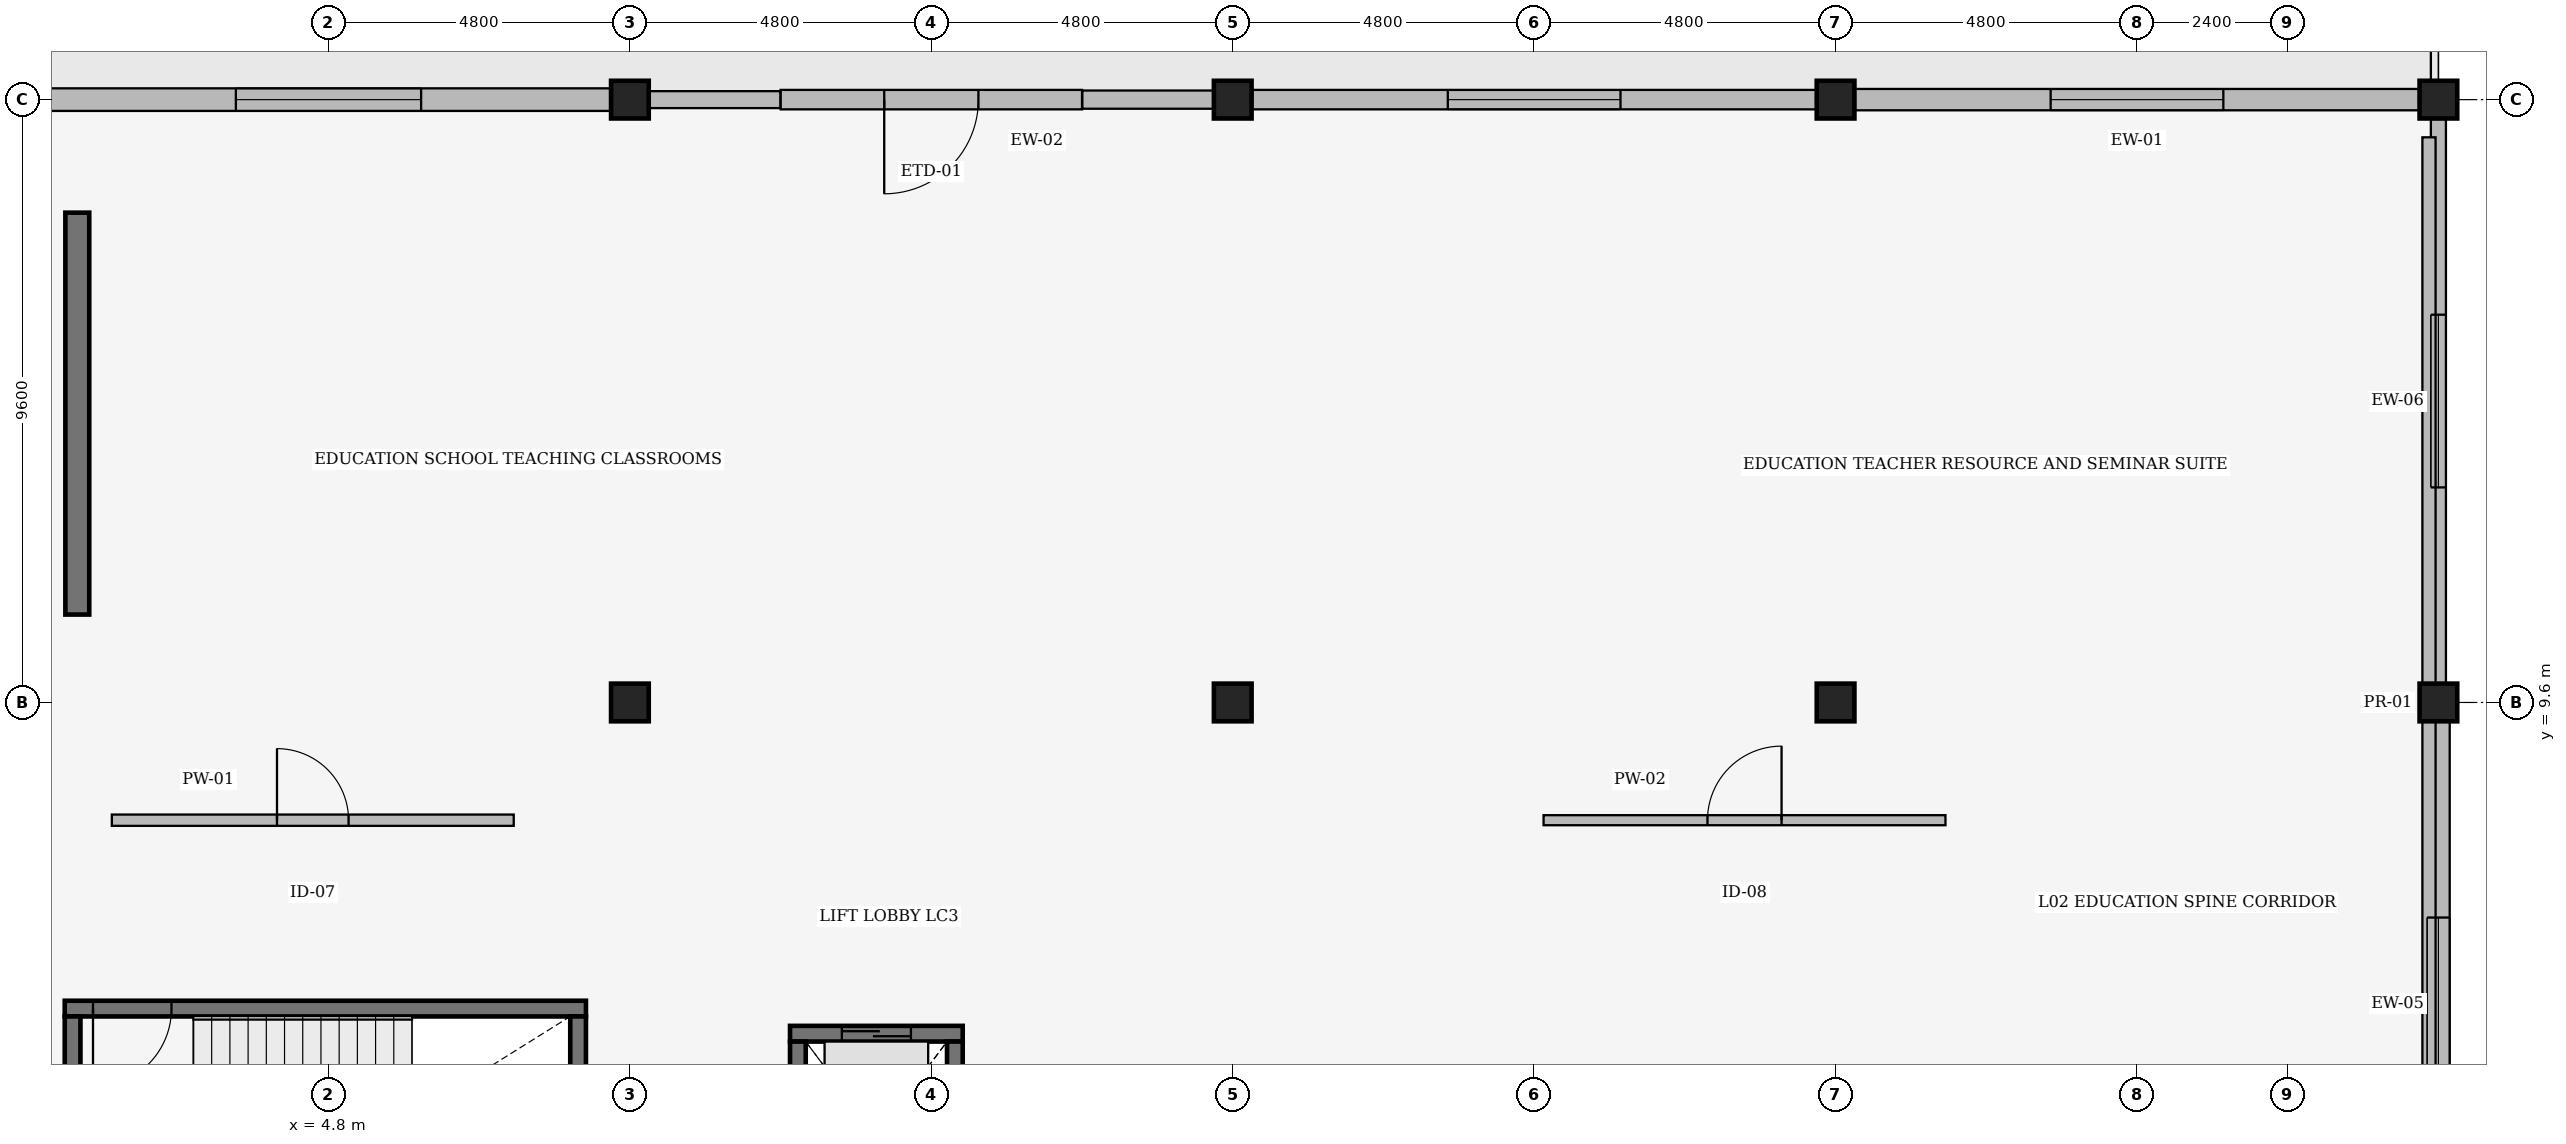
"""IFC4 building model, lengths in metres.
Left out: names, types, materials, properties, quantities, classifications, styles, units other than length and angle.
Written with IfcOpenShell. Run it as: python <this file> out.ifc"""

import sys

from ifc_helpers import new_model, si_unit, direction, frame, frame_2d, origin, origin_2d, place, context, subcontext, project, spatial, rectangle, extrude, element, fill, save


model = new_model("IFC4")
c1 = context("Model", 3, precision=1e-05, world=origin(), true_north=direction((0.0, 1.0)))
c2 = subcontext(c1, "Body", "Model", "MODEL_VIEW")
j1 = project(units=[si_unit("LENGTHUNIT", "METRE"), si_unit("PLANEANGLEUNIT", "RADIAN")], contexts=[c1])
p1 = place(None, origin())
s1 = spatial("IfcSite", under=j1, at=p1, CompositionType="ELEMENT")
p2 = place(p1, origin())
s2 = spatial("IfcBuilding", under=s1, at=p2, CompositionType="ELEMENT")
p3 = place(p2, frame((0.0, 0.0, 10.5)))
s3 = spatial("IfcBuildingStorey", under=s2, at=p3, CompositionType="ELEMENT", Elevation=10.5)
for number, where, z_axis, x_axis in (
    (1, (9.6, 9.6, 0.0), (0.0, 0.0, 1.0), (1.0, 0.0, 0.0)),
    (2, (9.6, 19.2, 0.0), (0.0, 0.0, 1.0), (1.0, 0.0, 0.0)),
    (3, (19.2, 9.6, 0.0), (0.0, 0.0, 1.0), (1.0, 0.0, 0.0)),
    (4, (19.2, 19.2, 0.0), (0.0, 0.0, 1.0), (1.0, 0.0, 0.0)),
    (5, (28.8, 9.6, 0.0), (0.0, 0.0, 1.0), (1.0, 0.0, 0.0)),
    (6, (28.8, 19.2, 0.0), (0.0, 0.0, 1.0), (1.0, 0.0, 0.0)),
    (7, (38.4, 9.6, 0.0), (0.0, 0.0, 1.0), (1.0, 0.0, 0.0)),
    (8, (38.4, 19.2, 0.0), (0.0, 0.0, 1.0), (1.0, 0.0, 0.0)),
):
    element("IfcColumn", number, at=place(p3, frame(where, z_axis=z_axis, x_axis=x_axis)), inside=s3, PredefinedType="COLUMN", context=c2, shape_type="SweptSolid", body=[
        extrude(rectangle(XDim=0.6, YDim=0.6, at=origin_2d()), origin(), (0.0, 0.0, 1.0), 4.8),
    ])
p4 = place(p3, frame((0.8, 11.0, 0.0), z_axis=(0.0, 0.0, 1.0), x_axis=(0.0, 1.0, 0.0)))
e9 = element("IfcWall", 9, at=p4, inside=s3, PredefinedType="SHEAR", context=c2, shape_type="SweptSolid", body=[
    extrude(rectangle(XDim=6.4, YDim=0.38, at=frame_2d((3.2, 0.0))), origin(), (0.0, 0.0, 1.0), 4.8),
])
p5 = place(p3, frame((16.8, 19.2, 0.0), z_axis=(0.0, 0.0, 1.0), x_axis=(-1.0, 0.0, 0.0)))
e10 = element("IfcWall", 10, at=p5, inside=s3, PredefinedType="SOLIDWALL", context=c2, shape_type="SweptSolid", body=[
    extrude(rectangle(XDim=4.8, YDim=0.31, at=frame_2d((2.4, 0.0))), origin(), (0.0, 0.0, 1.0), 4.283),
])
p6 = place(p5, frame((3.15, 0.0, 0.0), z_axis=(0.0, 0.0, 1.0), x_axis=(-1.0, 0.0, 0.0)))
e11 = element("IfcOpeningElement", 11, at=p6, cuts=e10, PredefinedType="OPENING", context=c2, shape_type="SweptSolid", body=[
    extrude(rectangle(XDim=1.5, YDim=2.25, at=frame_2d((0.75, 1.125))), frame((0.0, 0.165, 0.0), z_axis=(0.0, -1.0, 0.0), x_axis=(1.0, 0.0, 0.0)), (0.0, 0.0, 1.0), 0.33),
])
p7 = place(p3, frame((38.4, 0.308, 0.0), z_axis=(0.0, 0.0, 1.0), x_axis=(0.0, 1.0, 0.0)))
e12 = element("IfcWall", 12, at=p7, inside=s3, PredefinedType="SOLIDWALL", context=c2, shape_type="SweptSolid", body=[
    extrude(rectangle(XDim=8.984, YDim=0.36, at=frame_2d((4.492, 0.0))), origin(), (0.0, 0.0, 1.0), 4.123),
])
p8 = place(p7, frame((3.117, 0.0, 0.95)))
e13 = element("IfcOpeningElement", 13, at=p8, cuts=e12, PredefinedType="OPENING", context=c2, shape_type="SweptSolid", body=[
    extrude(rectangle(XDim=2.75, YDim=1.2, at=frame_2d((1.375, 0.6))), frame((0.0, 0.19, 0.0), z_axis=(0.0, -1.0, 0.0), x_axis=(1.0, 0.0, 0.0)), (0.0, 0.0, 1.0), 0.38),
])
p9 = place(p3, frame((38.4, 9.908, 0.0), z_axis=(0.0, 0.0, 1.0), x_axis=(0.0, 1.0, 0.0)))
e14 = element("IfcWall", 14, at=p9, inside=s3, PredefinedType="SOLIDWALL", context=c2, shape_type="SweptSolid", body=[
    extrude(rectangle(XDim=8.984, YDim=0.24, at=frame_2d((4.492, 0.0))), origin(), (0.0, 0.0, 1.0), 4.123),
])
p10 = place(p9, frame((3.117, 0.0, 0.95)))
e15 = element("IfcOpeningElement", 15, at=p10, cuts=e14, PredefinedType="OPENING", context=c2, shape_type="SweptSolid", body=[
    extrude(rectangle(XDim=2.75, YDim=1.5, at=frame_2d((1.375, 0.75))), frame((0.0, 0.13, 0.0), z_axis=(0.0, -1.0, 0.0), x_axis=(1.0, 0.0, 0.0)), (0.0, 0.0, 1.0), 0.26),
])
p11 = place(p3, frame((38.092, 19.2, 0.0), z_axis=(0.0, 0.0, 1.0), x_axis=(-1.0, 0.0, 0.0)))
e16 = element("IfcWall", 16, at=p11, inside=s3, PredefinedType="SOLIDWALL", context=c2, shape_type="SweptSolid", body=[
    extrude(rectangle(XDim=8.984, YDim=0.34, at=frame_2d((4.492, 0.0))), origin(), (0.0, 0.0, 1.0), 4.178),
])
p12 = place(p11, frame((3.117, 0.0, 0.95)))
e17 = element("IfcOpeningElement", 17, at=p12, cuts=e16, PredefinedType="OPENING", context=c2, shape_type="SweptSolid", body=[
    extrude(rectangle(XDim=2.75, YDim=1.8, at=frame_2d((1.375, 0.9))), frame((0.0, 0.18, 0.0), z_axis=(0.0, -1.0, 0.0), x_axis=(1.0, 0.0, 0.0)), (0.0, 0.0, 1.0), 0.36),
])
p13 = place(p3, frame((28.492, 19.2, 0.0), z_axis=(0.0, 0.0, 1.0), x_axis=(-1.0, 0.0, 0.0)))
e18 = element("IfcWall", 18, at=p13, inside=s3, PredefinedType="SOLIDWALL", context=c2, shape_type="SweptSolid", body=[
    extrude(rectangle(XDim=8.984, YDim=0.31, at=frame_2d((4.492, 0.0))), origin(), (0.0, 0.0, 1.0), 3.875),
])
p14 = place(p13, frame((3.117, 0.0, 0.95)))
e19 = element("IfcOpeningElement", 19, at=p14, cuts=e18, PredefinedType="OPENING", context=c2, shape_type="SweptSolid", body=[
    extrude(rectangle(XDim=2.75, YDim=2.1, at=frame_2d((1.375, 1.05))), frame((0.0, 0.165, 0.0), z_axis=(0.0, -1.0, 0.0), x_axis=(1.0, 0.0, 0.0)), (0.0, 0.0, 1.0), 0.33),
])
p15 = place(p3, frame((18.892, 19.2, 0.0), z_axis=(0.0, 0.0, 1.0), x_axis=(-1.0, 0.0, 0.0)))
e20 = element("IfcWall", 20, at=p15, inside=s3, PredefinedType="SOLIDWALL", context=c2, shape_type="SweptSolid", body=[
    extrude(rectangle(XDim=2.087, YDim=0.29, at=frame_2d((1.043, 0.0))), origin(), (0.0, 0.0, 1.0), 3.875),
])
p16 = place(p3, frame((11.995, 19.2, 0.0), z_axis=(0.0, 0.0, 1.0), x_axis=(-1.0, 0.0, 0.0)))
e21 = element("IfcWall", 21, at=p16, inside=s3, PredefinedType="SOLIDWALL", context=c2, shape_type="SweptSolid", body=[
    extrude(rectangle(XDim=2.087, YDim=0.27, at=frame_2d((1.043, 0.0))), origin(), (0.0, 0.0, 1.0), 4.283),
])
p17 = place(p3, frame((9.292, 19.2, 0.0), z_axis=(0.0, 0.0, 1.0), x_axis=(-1.0, 0.0, 0.0)))
e22 = element("IfcWall", 22, at=p17, inside=s3, PredefinedType="SOLIDWALL", context=c2, shape_type="SweptSolid", body=[
    extrude(rectangle(XDim=8.984, YDim=0.36, at=frame_2d((4.492, 0.0))), origin(), (0.0, 0.0, 1.0), 4.178),
])
p18 = place(p17, frame((3.017, 0.0, 0.95)))
e23 = element("IfcOpeningElement", 23, at=p18, cuts=e22, PredefinedType="OPENING", context=c2, shape_type="SweptSolid", body=[
    extrude(rectangle(XDim=2.95, YDim=1.2, at=frame_2d((1.475, 0.6))), frame((0.0, 0.19, 0.0), z_axis=(0.0, -1.0, 0.0), x_axis=(1.0, 0.0, 0.0)), (0.0, 0.0, 1.0), 0.38),
])
p19 = place(p3, frame((38.25, 0.6, 4.8), z_axis=(0.0, 0.0, 1.0), x_axis=(0.0, 1.0, 0.0)))
e24 = element("IfcWall", 24, at=p19, inside=s3, PredefinedType="PARAPET", context=c2, shape_type="SweptSolid", body=[
    extrude(rectangle(XDim=18.0, YDim=0.21, at=frame_2d((9.0, 0.0))), origin(), (0.0, 0.0, 1.0), 0.55),
])
p20 = place(p3, frame((8.9, 4.725, 0.0), z_axis=(0.0, 0.0, 1.0), x_axis=(-1.0, 0.0, 0.0)))
e25 = element("IfcWall", 25, at=p20, inside=s3, PredefinedType="SHEAR", context=c2, shape_type="SweptSolid", body=[
    extrude(rectangle(XDim=8.3, YDim=0.25, at=frame_2d((4.15, 0.0))), origin(), (0.0, 0.0, 1.0), 4.52),
])
p21 = place(p20, frame((7.85, 0.0, 0.0), z_axis=(0.0, 0.0, 1.0), x_axis=(-1.0, 0.0, 0.0)))
e26 = element("IfcOpeningElement", 26, at=p21, cuts=e25, PredefinedType="OPENING", context=c2, shape_type="SweptSolid", body=[
    extrude(rectangle(XDim=1.25, YDim=2.2, at=frame_2d((0.625, 1.1))), frame((0.0, 0.135, 0.0), z_axis=(0.0, -1.0, 0.0), x_axis=(1.0, 0.0, 0.0)), (0.0, 0.0, 1.0), 0.27),
])
for number, where, z_axis, x_axis in (
    (27, (0.725, 4.6, 0.0), (0.0, 0.0, 1.0), (0.0, -1.0, 0.0)),
    (28, (8.775, 0.85, 0.0), (0.0, 0.0, 1.0), (0.0, 1.0, 0.0)),
):
    element("IfcWall", number, at=place(p3, frame(where, z_axis=z_axis, x_axis=x_axis)), inside=s3, PredefinedType="SHEAR", context=c2, shape_type="SweptSolid", body=[
        extrude(rectangle(XDim=3.75, YDim=0.25, at=frame_2d((1.875, 0.0))), origin(), (0.0, 0.0, 1.0), 4.52),
    ])
p22 = place(p3, frame((12.15, 4.325, 0.0), z_axis=(0.0, 0.0, 1.0), x_axis=(1.0, 0.0, 0.0)))
e29 = element("IfcWall", 29, at=p22, inside=s3, PredefinedType="SHEAR", context=c2, shape_type="SweptSolid", body=[
    extrude(rectangle(XDim=2.75, YDim=0.25, at=frame_2d((1.375, 0.0))), origin(), (0.0, 0.0, 1.0), 4.52),
])
p23 = place(p22, frame((0.825, 0.0, 0.0)))
e30 = element("IfcOpeningElement", 30, at=p23, cuts=e29, PredefinedType="OPENING", context=c2, shape_type="SweptSolid", body=[
    extrude(rectangle(XDim=1.1, YDim=2.2, at=frame_2d((0.55, 1.1))), frame((0.0, 0.135, 0.0), z_axis=(0.0, -1.0, 0.0), x_axis=(1.0, 0.0, 0.0)), (0.0, 0.0, 1.0), 0.27),
])
for number, where, z_axis, x_axis in (
    (31, (12.275, 1.2, 0.0), (0.0, 0.0, 1.0), (0.0, 1.0, 0.0)),
    (32, (14.775, 1.2, 0.0), (0.0, 0.0, 1.0), (0.0, 1.0, 0.0)),
):
    element("IfcWall", number, at=place(p3, frame(where, z_axis=z_axis, x_axis=x_axis)), inside=s3, PredefinedType="SHEAR", context=c2, shape_type="SweptSolid", body=[
        extrude(rectangle(XDim=3.0, YDim=0.25, at=frame_2d((1.5, 0.0))), origin(), (0.0, 0.0, 1.0), 4.52),
    ])
p24 = place(p3, frame((1.35, 7.725, 0.0), z_axis=(0.0, 0.0, 1.0), x_axis=(1.0, 0.0, 0.0)))
e33 = element("IfcWall", 33, at=p24, inside=s3, PredefinedType="PARTITIONING", context=c2, shape_type="SweptSolid", body=[
    extrude(rectangle(XDim=6.4, YDim=0.18, at=frame_2d((3.2, 0.0))), origin(), (0.0, 0.0, 1.0), 4.44),
])
p25 = place(p24, frame((2.63, 0.0, 0.0)))
e34 = element("IfcOpeningElement", 34, at=p25, cuts=e33, PredefinedType="OPENING", context=c2, shape_type="SweptSolid", body=[
    extrude(rectangle(XDim=1.14, YDim=2.22, at=frame_2d((0.57, 1.11))), frame((0.0, 0.1, 0.0), z_axis=(0.0, -1.0, 0.0), x_axis=(1.0, 0.0, 0.0)), (0.0, 0.0, 1.0), 0.2),
])
p26 = place(p3, frame((24.15, 7.725, 0.0), z_axis=(0.0, 0.0, 1.0), x_axis=(1.0, 0.0, 0.0)))
e35 = element("IfcWall", 35, at=p26, inside=s3, PredefinedType="PARTITIONING", context=c2, shape_type="SweptSolid", body=[
    extrude(rectangle(XDim=6.4, YDim=0.16, at=frame_2d((3.2, 0.0))), origin(), (0.0, 0.0, 1.0), 3.942),
])
p27 = place(p26, frame((2.61, 0.0, 0.0)))
e36 = element("IfcOpeningElement", 36, at=p27, cuts=e35, PredefinedType="OPENING", context=c2, shape_type="SweptSolid", body=[
    extrude(rectangle(XDim=1.18, YDim=2.22, at=frame_2d((0.59, 1.11))), frame((0.0, 0.09, 0.0), z_axis=(0.0, -1.0, 0.0), x_axis=(1.0, 0.0, 0.0)), (0.0, 0.0, 1.0), 0.18),
])
p28 = place(p6, origin())
e37 = element("IfcDoor", 37, at=p28, inside=s3, OperationType="SINGLE_SWING_LEFT", PredefinedType="DOOR", context=c2, shape_type="SweptSolid", body=[
    extrude(rectangle(XDim=1.5, YDim=2.25, at=frame_2d((0.75, 1.125))), frame((0.0, 0.025, 0.0), z_axis=(0.0, -1.0, 0.0), x_axis=(1.0, 0.0, 0.0)), (0.0, 0.0, 1.0), 0.05),
])
fill(e11, e37)
p29 = place(p8, origin())
e38 = element("IfcWindow", 38, at=p29, inside=s3, PartitioningType="SINGLE_PANEL", PredefinedType="WINDOW", context=c2, shape_type="SweptSolid", body=[
    extrude(rectangle(XDim=2.75, YDim=1.2, at=frame_2d((1.375, 0.6))), frame((0.0, 0.03, 0.0), z_axis=(0.0, -1.0, 0.0), x_axis=(1.0, 0.0, 0.0)), (0.0, 0.0, 1.0), 0.06),
])
fill(e13, e38)
p30 = place(p10, origin())
e39 = element("IfcWindow", 39, at=p30, inside=s3, PartitioningType="SINGLE_PANEL", PredefinedType="WINDOW", context=c2, shape_type="SweptSolid", body=[
    extrude(rectangle(XDim=2.75, YDim=1.5, at=frame_2d((1.375, 0.75))), frame((0.0, 0.03, 0.0), z_axis=(0.0, -1.0, 0.0), x_axis=(1.0, 0.0, 0.0)), (0.0, 0.0, 1.0), 0.06),
])
fill(e15, e39)
p31 = place(p12, origin())
e40 = element("IfcWindow", 40, at=p31, inside=s3, PartitioningType="SINGLE_PANEL", PredefinedType="WINDOW", context=c2, shape_type="SweptSolid", body=[
    extrude(rectangle(XDim=2.75, YDim=1.8, at=frame_2d((1.375, 0.9))), frame((0.0, 0.03, 0.0), z_axis=(0.0, -1.0, 0.0), x_axis=(1.0, 0.0, 0.0)), (0.0, 0.0, 1.0), 0.06),
])
fill(e17, e40)
p32 = place(p14, origin())
e41 = element("IfcWindow", 41, at=p32, inside=s3, PartitioningType="SINGLE_PANEL", PredefinedType="WINDOW", context=c2, shape_type="SweptSolid", body=[
    extrude(rectangle(XDim=2.75, YDim=2.1, at=frame_2d((1.375, 1.05))), frame((0.0, 0.03, 0.0), z_axis=(0.0, -1.0, 0.0), x_axis=(1.0, 0.0, 0.0)), (0.0, 0.0, 1.0), 0.06),
])
fill(e19, e41)
p33 = place(p18, origin())
e42 = element("IfcWindow", 42, at=p33, inside=s3, PartitioningType="SINGLE_PANEL", PredefinedType="WINDOW", context=c2, shape_type="SweptSolid", body=[
    extrude(rectangle(XDim=2.95, YDim=1.2, at=frame_2d((1.475, 0.6))), frame((0.0, 0.03, 0.0), z_axis=(0.0, -1.0, 0.0), x_axis=(1.0, 0.0, 0.0)), (0.0, 0.0, 1.0), 0.06),
])
fill(e23, e42)
p34 = place(p21, origin())
e43 = element("IfcDoor", 43, at=p34, inside=s3, OperationType="SINGLE_SWING_LEFT", PredefinedType="DOOR", context=c2, shape_type="SweptSolid", body=[
    extrude(rectangle(XDim=1.25, YDim=2.2, at=frame_2d((0.625, 1.1))), frame((0.0, 0.025, 0.0), z_axis=(0.0, -1.0, 0.0), x_axis=(1.0, 0.0, 0.0)), (0.0, 0.0, 1.0), 0.05),
])
fill(e26, e43)
p35 = place(p23, origin())
e44 = element("IfcDoor", 44, at=p35, inside=s3, OperationType="DOUBLE_DOOR_SLIDING", PredefinedType="DOOR", context=c2, shape_type="SweptSolid", body=[
    extrude(rectangle(XDim=1.1, YDim=2.2, at=frame_2d((0.55, 1.1))), frame((0.0, 0.025, 0.0), z_axis=(0.0, -1.0, 0.0), x_axis=(1.0, 0.0, 0.0)), (0.0, 0.0, 1.0), 0.05),
])
fill(e30, e44)
p36 = place(p25, origin())
e45 = element("IfcDoor", 45, at=p36, inside=s3, OperationType="SINGLE_SWING_LEFT", PredefinedType="DOOR", context=c2, shape_type="SweptSolid", body=[
    extrude(rectangle(XDim=1.14, YDim=2.22, at=frame_2d((0.57, 1.11))), frame((0.0, 0.025, 0.0), z_axis=(0.0, -1.0, 0.0), x_axis=(1.0, 0.0, 0.0)), (0.0, 0.0, 1.0), 0.05),
])
fill(e34, e45)
p37 = place(p27, origin())
e46 = element("IfcDoor", 46, at=p37, inside=s3, OperationType="SINGLE_SWING_RIGHT", PredefinedType="DOOR", context=c2, shape_type="SweptSolid", body=[
    extrude(rectangle(XDim=1.18, YDim=2.22, at=frame_2d((0.59, 1.11))), frame((0.0, 0.025, 0.0), z_axis=(0.0, -1.0, 0.0), x_axis=(1.0, 0.0, 0.0)), (0.0, 0.0, 1.0), 0.05),
])
fill(e36, e46)
save(model, sys.argv[1])
